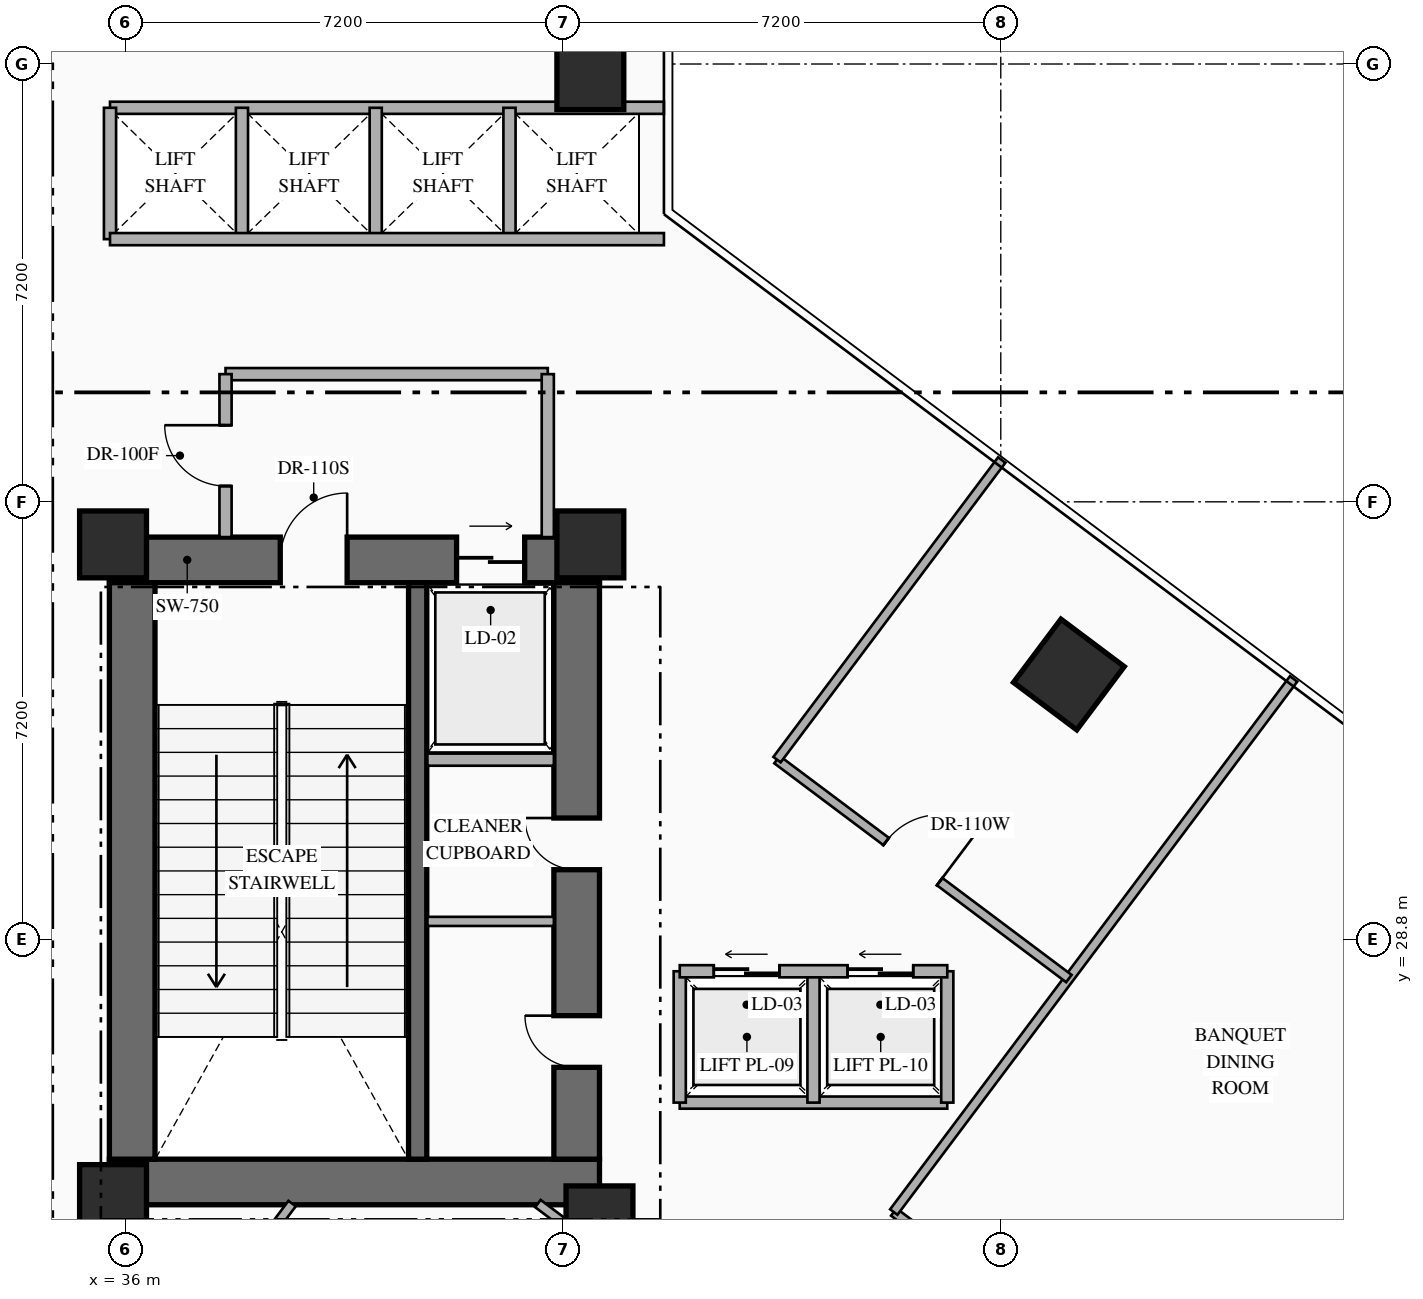
"""IFC4 building model, lengths in metres.
Left out: names, types, materials, properties, quantities, classifications, styles, units other than length and angle.
Written with IfcOpenShell. Run it as: python <this file> out.ifc"""

import sys

from ifc_helpers import new_model, si_unit, direction, frame, frame_2d, origin, origin_2d, place, context, subcontext, project, spatial, rectangle, extrude, element, fill, save


model = new_model("IFC4")
c1 = context("Model", 3, precision=1e-05, world=origin(), true_north=direction((0.0, 1.0)))
c2 = subcontext(c1, "Body", "Model", "MODEL_VIEW")
j1 = project(units=[si_unit("LENGTHUNIT", "METRE"), si_unit("PLANEANGLEUNIT", "RADIAN")], contexts=[c1])
p1 = place(None, origin())
s1 = spatial("IfcSite", under=j1, at=p1, CompositionType="ELEMENT")
p2 = place(p1, origin())
s2 = spatial("IfcBuilding", under=s1, at=p2, CompositionType="ELEMENT")
p3 = place(p2, frame((0.0, 0.0, 16.2)))
s3 = spatial("IfcBuildingStorey", under=s2, at=p3, CompositionType="ELEMENT", Elevation=16.2)
p4 = place(p3, frame((35.74, 24.815, 0.0), z_axis=(0.0, 0.0, 1.0), x_axis=(1.0, 0.0, 0.0)))
e1 = element("IfcWall", 1, at=p4, inside=s3, PredefinedType="SHEAR", context=c2, shape_type="SweptSolid", body=[
    extrude(rectangle(XDim=8.06, YDim=0.75, at=frame_2d((4.03, 0.0))), origin(), (0.0, 0.0, 1.0), 5.4),
])
p5 = place(p3, frame((35.74, 35.045, 0.0), z_axis=(0.0, 0.0, 1.0), x_axis=(1.0, 0.0, 0.0)))
e2 = element("IfcWall", 2, at=p5, inside=s3, PredefinedType="SHEAR", context=c2, shape_type="SweptSolid", body=[
    extrude(rectangle(XDim=8.06, YDim=0.75, at=frame_2d((4.03, 0.0))), origin(), (0.0, 0.0, 1.0), 5.4),
])
p6 = place(p5, frame((2.81, 0.0, 0.0)))
e3 = element("IfcOpeningElement", 3, at=p6, cuts=e2, PredefinedType="OPENING", context=c2, shape_type="SweptSolid", body=[
    extrude(rectangle(XDim=1.1, YDim=2.2, at=frame_2d((0.55, 1.1))), frame((0.0, 0.385, 0.0), z_axis=(0.0, -1.0, 0.0), x_axis=(1.0, 0.0, 0.0)), (0.0, 0.0, 1.0), 0.77),
])
p7 = place(p5, frame((5.71, 0.0, 0.0)))
e4 = element("IfcOpeningElement", 4, at=p7, cuts=e2, PredefinedType="OPENING", context=c2, shape_type="SweptSolid", body=[
    extrude(rectangle(XDim=1.12, YDim=2.15, at=frame_2d((0.56, 1.075))), frame((0.0, 0.385, 0.0), z_axis=(0.0, -1.0, 0.0), x_axis=(1.0, 0.0, 0.0)), (0.0, 0.0, 1.0), 0.77),
])
p8 = place(p3, frame((36.115, 25.19, 0.0), z_axis=(0.0, 0.0, 1.0), x_axis=(0.0, 1.0, 0.0)))
e5 = element("IfcWall", 5, at=p8, inside=s3, PredefinedType="SHEAR", context=c2, shape_type="SweptSolid", body=[
    extrude(rectangle(XDim=9.48, YDim=0.75, at=frame_2d((4.74, 0.0))), origin(), (0.0, 0.0, 1.0), 5.4),
])
p9 = place(p3, frame((43.425, 25.19, 0.0), z_axis=(0.0, 0.0, 1.0), x_axis=(0.0, 1.0, 0.0)))
e6 = element("IfcWall", 6, at=p9, inside=s3, PredefinedType="SHEAR", context=c2, shape_type="SweptSolid", body=[
    extrude(rectangle(XDim=9.48, YDim=0.75, at=frame_2d((4.74, 0.0))), origin(), (0.0, 0.0, 1.0), 5.4),
])
p10 = place(p9, frame((1.51, 0.0, 0.0)))
e7 = element("IfcOpeningElement", 7, at=p10, cuts=e6, PredefinedType="OPENING", context=c2, shape_type="SweptSolid", body=[
    extrude(rectangle(XDim=0.85, YDim=2.08, at=frame_2d((0.425, 1.04))), frame((0.0, 0.385, 0.0), z_axis=(0.0, -1.0, 0.0), x_axis=(1.0, 0.0, 0.0)), (0.0, 0.0, 1.0), 0.77),
])
p11 = place(p9, frame((4.76, 0.0, 0.0)))
e8 = element("IfcOpeningElement", 8, at=p11, cuts=e6, PredefinedType="OPENING", context=c2, shape_type="SweptSolid", body=[
    extrude(rectangle(XDim=0.85, YDim=2.08, at=frame_2d((0.425, 1.04))), frame((0.0, 0.385, 0.0), z_axis=(0.0, -1.0, 0.0), x_axis=(1.0, 0.0, 0.0)), (0.0, 0.0, 1.0), 0.77),
])
p12 = place(p3, frame((40.81, 25.19, 0.0), z_axis=(0.0, 0.0, 1.0), x_axis=(0.0, 1.0, 0.0)))
e9 = element("IfcWall", 9, at=p12, inside=s3, PredefinedType="SHEAR", context=c2, shape_type="SweptSolid", body=[
    extrude(rectangle(XDim=9.48, YDim=0.3, at=frame_2d((4.74, 0.0))), origin(), (0.0, 0.0, 1.0), 5.4),
])
for number, where, z_axis, x_axis in (
    (10, (35.8, 24.55, 0.0), (0.0, 0.0, 1.0), (1.0, 0.0, 0.0)),
    (11, (43.8, 24.2, 0.0), (0.0, 0.0, 1.0), (1.0, 0.0, 0.0)),
    (12, (35.8, 35.3, 0.0), (0.0, 0.0, 1.0), (1.0, 0.0, 0.0)),
    (13, (43.65, 35.3, 0.0), (0.0, 0.0, 1.0), (1.0, 0.0, 0.0)),
    (14, (43.65, 43.0, 0.0), (0.0, 0.0, 1.0), (1.0, 0.0, 0.0)),
):
    element("IfcColumn", number, at=place(p3, frame(where, z_axis=z_axis, x_axis=x_axis)), inside=s3, PredefinedType="COLUMN", context=c2, shape_type="SweptSolid", body=[
        extrude(rectangle(XDim=1.1, YDim=1.1, at=origin_2d()), origin(), (0.0, 0.0, 1.0), 5.4),
    ])
p13 = place(p3, frame((51.52, 33.16, 0.0), z_axis=(0.0, 0.0, 1.0), x_axis=(0.799999996291, -0.600000004945, 0.0)))
e15 = element("IfcColumn", 15, at=p13, inside=s3, PredefinedType="COLUMN", context=c2, shape_type="SweptSolid", body=[
    extrude(rectangle(XDim=1.3, YDim=1.3, at=origin_2d()), origin(), (0.0, 0.0, 1.0), 5.4),
])
p14 = place(p3, frame((40.97, 31.76, 0.0), z_axis=(0.0, 0.0, 1.0), x_axis=(1.0, 0.0, 0.0)))
e16 = element("IfcWall", 16, at=p14, inside=s3, PredefinedType="STANDARD", context=c2, shape_type="SweptSolid", body=[
    extrude(rectangle(XDim=2.08, YDim=0.2, at=frame_2d((1.04, 0.0))), origin(), (0.0, 0.0, 1.0), 5.1),
])
p15 = place(p3, frame((40.97, 29.1, 0.0), z_axis=(0.0, 0.0, 1.0), x_axis=(1.0, 0.0, 0.0)))
e17 = element("IfcWall", 17, at=p15, inside=s3, PredefinedType="PARTITIONING", context=c2, shape_type="SweptSolid", body=[
    extrude(rectangle(XDim=2.08, YDim=0.15, at=frame_2d((1.04, 0.0))), origin(), (0.0, 0.0, 1.0), 5.1),
])
p16 = place(p3, frame((37.65, 38.1, 0.0), z_axis=(0.0, 0.0, 1.0), x_axis=(1.0, 0.0, 0.0)))
e18 = element("IfcWall", 18, at=p16, inside=s3, PredefinedType="STANDARD", context=c2, shape_type="SweptSolid", body=[
    extrude(rectangle(XDim=5.3, YDim=0.2, at=frame_2d((2.65, 0.0))), origin(), (0.0, 0.0, 1.0), 5.1),
])
p17 = place(p3, frame((42.95, 35.42, 0.0), z_axis=(0.0, 0.0, 1.0), x_axis=(0.0, 1.0, 0.0)))
e19 = element("IfcWall", 19, at=p17, inside=s3, PredefinedType="STANDARD", context=c2, shape_type="SweptSolid", body=[
    extrude(rectangle(XDim=2.68, YDim=0.2, at=frame_2d((1.34, 0.0))), origin(), (0.0, 0.0, 1.0), 5.1),
])
p18 = place(p3, frame((37.65, 35.42, 0.0), z_axis=(0.0, 0.0, 1.0), x_axis=(0.0, 1.0, 0.0)))
e20 = element("IfcWall", 20, at=p18, inside=s3, PredefinedType="STANDARD", context=c2, shape_type="SweptSolid", body=[
    extrude(rectangle(XDim=2.68, YDim=0.2, at=frame_2d((1.34, 0.0))), origin(), (0.0, 0.0, 1.0), 5.1),
])
p19 = place(p18, frame((0.84, 0.0, 0.0)))
e21 = element("IfcOpeningElement", 21, at=p19, cuts=e20, PredefinedType="OPENING", context=c2, shape_type="SweptSolid", body=[
    extrude(rectangle(XDim=1.0, YDim=2.2, at=frame_2d((0.5, 1.1))), frame((0.0, 0.11, 0.0), z_axis=(0.0, -1.0, 0.0), x_axis=(1.0, 0.0, 0.0)), (0.0, 0.0, 1.0), 0.22),
])
p20 = place(p3, frame((35.75, 42.48, 0.0), z_axis=(0.0, 0.0, 1.0), x_axis=(1.0, 0.0, 0.0)))
e22 = element("IfcWall", 22, at=p20, inside=s3, PredefinedType="STANDARD", context=c2, shape_type="SweptSolid", body=[
    extrude(rectangle(XDim=9.11, YDim=0.2, at=frame_2d((4.555, 0.0))), origin(), (0.0, 0.0, 1.0), 5.1),
])
for number, where, z_axis, x_axis in (
    (23, (35.75, 40.32, 0.0), (0.0, 0.0, 1.0), (0.0, 1.0, 0.0)),
    (24, (37.92, 40.32, 0.0), (0.0, 0.0, 1.0), (0.0, 1.0, 0.0)),
    (25, (40.12, 40.32, 0.0), (0.0, 0.0, 1.0), (0.0, 1.0, 0.0)),
    (26, (42.32, 40.32, 0.0), (0.0, 0.0, 1.0), (0.0, 1.0, 0.0)),
):
    element("IfcWall", number, at=place(p3, frame(where, z_axis=z_axis, x_axis=x_axis)), inside=s3, PredefinedType="STANDARD", context=c2, shape_type="SweptSolid", body=[
        extrude(rectangle(XDim=2.16, YDim=0.2, at=frame_2d((1.08, 0.0))), origin(), (0.0, 0.0, 1.0), 5.1),
    ])
p21 = place(p3, frame((35.75, 40.32, 0.0), z_axis=(0.0, 0.0, 1.0), x_axis=(1.0, 0.0, 0.0)))
e27 = element("IfcWall", 27, at=p21, inside=s3, PredefinedType="STANDARD", context=c2, shape_type="SweptSolid", body=[
    extrude(rectangle(XDim=9.11, YDim=0.2, at=frame_2d((4.555, 0.0))), origin(), (0.0, 0.0, 1.0), 5.1),
])
p22 = place(p3, frame((45.12, 26.12, 0.0), z_axis=(0.0, 0.0, 1.0), x_axis=(1.0, 0.0, 0.0)))
e28 = element("IfcWall", 28, at=p22, inside=s3, PredefinedType="STANDARD", context=c2, shape_type="SweptSolid", body=[
    extrude(rectangle(XDim=4.4, YDim=0.2, at=frame_2d((2.2, 0.0))), origin(), (0.0, 0.0, 1.0), 5.1),
])
for number, where, z_axis, x_axis in (
    (29, (45.12, 26.12, 0.0), (0.0, 0.0, 1.0), (0.0, 1.0, 0.0)),
    (30, (49.52, 26.12, 0.0), (0.0, 0.0, 1.0), (0.0, 1.0, 0.0)),
    (31, (47.32, 26.12, 0.0), (0.0, 0.0, 1.0), (0.0, 1.0, 0.0)),
):
    element("IfcWall", number, at=place(p3, frame(where, z_axis=z_axis, x_axis=x_axis)), inside=s3, PredefinedType="STANDARD", context=c2, shape_type="SweptSolid", body=[
        extrude(rectangle(XDim=2.16, YDim=0.2, at=frame_2d((1.08, 0.0))), origin(), (0.0, 0.0, 1.0), 5.1),
    ])
p23 = place(p3, frame((45.12, 28.28, 0.0), z_axis=(0.0, 0.0, 1.0), x_axis=(1.0, 0.0, 0.0)))
e32 = element("IfcWall", 32, at=p23, inside=s3, PredefinedType="STANDARD", context=c2, shape_type="SweptSolid", body=[
    extrude(rectangle(XDim=4.4, YDim=0.2, at=frame_2d((2.2, 0.0))), origin(), (0.0, 0.0, 1.0), 5.1),
])
p24 = place(p23, frame((0.56, 0.0, 0.0)))
e33 = element("IfcOpeningElement", 33, at=p24, cuts=e32, PredefinedType="OPENING", context=c2, shape_type="SweptSolid", body=[
    extrude(rectangle(XDim=1.08, YDim=2.15, at=frame_2d((0.54, 1.075))), frame((0.0, 0.11, 0.0), z_axis=(0.0, -1.0, 0.0), x_axis=(1.0, 0.0, 0.0)), (0.0, 0.0, 1.0), 0.22),
])
p25 = place(p23, frame((2.76, 0.0, 0.0)))
e34 = element("IfcOpeningElement", 34, at=p25, cuts=e32, PredefinedType="OPENING", context=c2, shape_type="SweptSolid", body=[
    extrude(rectangle(XDim=1.08, YDim=2.15, at=frame_2d((0.54, 1.075))), frame((0.0, 0.11, 0.0), z_axis=(0.0, -1.0, 0.0), x_axis=(1.0, 0.0, 0.0)), (0.0, 0.0, 1.0), 0.22),
])
p26 = place(p3, frame((48.64, 24.32, 0.0), z_axis=(0.0, 0.0, 1.0), x_axis=(0.80000474051, -0.599993679268, 0.0)))
e35 = element("IfcWall", 35, at=p26, inside=s3, PredefinedType="PARTITIONING", context=c2, shape_type="SweptSolid", body=[
    extrude(rectangle(XDim=6.18, YDim=0.15, at=frame_2d((3.09, 0.0))), origin(), (0.0, 0.0, 1.0), 5.1),
])
p27 = place(p26, frame((2.54, 0.0, 0.0)))
e36 = element("IfcOpeningElement", 36, at=p27, cuts=e35, PredefinedType="OPENING", context=c2, shape_type="SweptSolid", body=[
    extrude(rectangle(XDim=1.1, YDim=2.16, at=frame_2d((0.55, 1.08))), frame((0.0, 0.085, 0.0), z_axis=(0.0, -1.0, 0.0), x_axis=(1.0, 0.0, 0.0)), (0.0, 0.0, 1.0), 0.17),
])
p28 = place(p3, frame((48.64, 24.32, 0.0), z_axis=(0.0, 0.0, 1.0), x_axis=(0.600017820398, 0.799986634391, 0.0)))
e37 = element("IfcWall", 37, at=p28, inside=s3, PredefinedType="PARTITIONING", context=c2, shape_type="SweptSolid", body=[
    extrude(rectangle(XDim=10.96, YDim=0.15, at=frame_2d((5.48, 0.0))), origin(), (0.0, 0.0, 1.0), 5.1),
])
p29 = place(p3, frame((53.584, 20.612, 0.0), z_axis=(0.0, 0.0, 1.0), x_axis=(0.600003564151, 0.799997326874, 0.0)))
e38 = element("IfcWall", 38, at=p29, inside=s3, PredefinedType="PARTITIONING", context=c2, shape_type="SweptSolid", body=[
    extrude(rectangle(XDim=10.96, YDim=0.15, at=frame_2d((5.48, 0.0))), origin(), (0.0, 0.0, 1.0), 5.1),
])
p30 = place(p3, frame((46.72, 31.76, 0.0), z_axis=(0.0, 0.0, 1.0), x_axis=(0.79999511724, -0.600006510291, 0.0)))
e39 = element("IfcWall", 39, at=p30, inside=s3, PredefinedType="PARTITIONING", context=c2, shape_type="SweptSolid", body=[
    extrude(rectangle(XDim=6.0, YDim=0.15, at=frame_2d((3.0, 0.0))), origin(), (0.0, 0.0, 1.0), 5.1),
])
p31 = place(p30, frame((2.243, 0.0, 0.0)))
e40 = element("IfcOpeningElement", 40, at=p31, cuts=e39, PredefinedType="OPENING", context=c2, shape_type="SweptSolid", body=[
    extrude(rectangle(XDim=1.1, YDim=2.16, at=frame_2d((0.55, 1.08))), frame((0.0, 0.085, 0.0), z_axis=(0.0, -1.0, 0.0), x_axis=(1.0, 0.0, 0.0)), (0.0, 0.0, 1.0), 0.17),
])
p32 = place(p3, frame((46.72, 31.76, 0.0), z_axis=(0.0, 0.0, 1.0), x_axis=(0.600006341286, 0.799995243996, 0.0)))
e41 = element("IfcWall", 41, at=p32, inside=s3, PredefinedType="PARTITIONING", context=c2, shape_type="SweptSolid", body=[
    extrude(rectangle(XDim=6.16, YDim=0.15, at=frame_2d((3.08, 0.0))), origin(), (0.0, 0.0, 1.0), 5.1),
])
p33 = place(p3, frame((42.787, 24.46, 0.0), z_axis=(0.0, 0.0, 1.0), x_axis=(0.799971872363, -0.600037501685, 0.0)))
e42 = element("IfcWall", 42, at=p33, inside=s3, PredefinedType="PARTITIONING", context=c2, shape_type="SweptSolid", body=[
    extrude(rectangle(XDim=4.167, YDim=0.15, at=frame_2d((2.083, 0.0))), origin(), (0.0, 0.0, 1.0), 5.1),
])
p34 = place(p33, frame((2.468, 0.0, 0.0)))
e43 = element("IfcOpeningElement", 43, at=p34, cuts=e42, PredefinedType="OPENING", context=c2, shape_type="SweptSolid", body=[
    extrude(rectangle(XDim=0.95, YDim=2.15, at=frame_2d((0.475, 1.075))), frame((0.0, 0.085, 0.0), z_axis=(0.0, -1.0, 0.0), x_axis=(1.0, 0.0, 0.0)), (0.0, 0.0, 1.0), 0.17),
])
p35 = place(p3, frame((33.384, 17.312, 0.0), z_axis=(0.0, 0.0, 1.0), x_axis=(0.600008743659, 0.799993442181, 0.0)))
e44 = element("IfcWall", 44, at=p35, inside=s3, PredefinedType="PARTITIONING", context=c2, shape_type="SweptSolid", body=[
    extrude(rectangle(XDim=8.935, YDim=0.15, at=frame_2d((4.468, 0.0))), origin(), (0.0, 0.0, 1.0), 5.1),
])
p36 = place(p6, origin())
e45 = element("IfcDoor", 45, at=p36, inside=s3, OperationType="SINGLE_SWING_RIGHT", PredefinedType="DOOR", context=c2, shape_type="SweptSolid", body=[
    extrude(rectangle(XDim=1.1, YDim=2.2, at=frame_2d((0.55, 1.1))), frame((0.0, 0.025, 0.0), z_axis=(0.0, -1.0, 0.0), x_axis=(1.0, 0.0, 0.0)), (0.0, 0.0, 1.0), 0.05),
])
fill(e3, e45)
p37 = place(p7, origin())
e46 = element("IfcDoor", 46, at=p37, inside=s3, OperationType="SLIDING_TO_RIGHT", PredefinedType="USERDEFINED", context=c2, shape_type="SweptSolid", body=[
    extrude(rectangle(XDim=1.12, YDim=2.15, at=frame_2d((0.56, 1.075))), frame((0.0, 0.025, 0.0), z_axis=(0.0, -1.0, 0.0), x_axis=(1.0, 0.0, 0.0)), (0.0, 0.0, 1.0), 0.05),
])
fill(e4, e46)
p38 = place(p10, origin())
e47 = element("IfcDoor", 47, at=p38, inside=s3, OperationType="SINGLE_SWING_RIGHT", PredefinedType="DOOR", context=c2, shape_type="SweptSolid", body=[
    extrude(rectangle(XDim=0.85, YDim=2.08, at=frame_2d((0.425, 1.04))), frame((0.0, 0.025, 0.0), z_axis=(0.0, -1.0, 0.0), x_axis=(1.0, 0.0, 0.0)), (0.0, 0.0, 1.0), 0.05),
])
fill(e7, e47)
p39 = place(p11, origin())
e48 = element("IfcDoor", 48, at=p39, inside=s3, OperationType="SINGLE_SWING_RIGHT", PredefinedType="DOOR", context=c2, shape_type="SweptSolid", body=[
    extrude(rectangle(XDim=0.85, YDim=2.08, at=frame_2d((0.425, 1.04))), frame((0.0, 0.025, 0.0), z_axis=(0.0, -1.0, 0.0), x_axis=(1.0, 0.0, 0.0)), (0.0, 0.0, 1.0), 0.05),
])
fill(e8, e48)
p40 = place(p19, origin())
e49 = element("IfcDoor", 49, at=p40, inside=s3, OperationType="SINGLE_SWING_RIGHT", PredefinedType="DOOR", context=c2, shape_type="SweptSolid", body=[
    extrude(rectangle(XDim=1.0, YDim=2.2, at=frame_2d((0.5, 1.1))), frame((0.0, 0.025, 0.0), z_axis=(0.0, -1.0, 0.0), x_axis=(1.0, 0.0, 0.0)), (0.0, 0.0, 1.0), 0.05),
])
fill(e21, e49)
p41 = place(p24, origin())
e50 = element("IfcDoor", 50, at=p41, inside=s3, OperationType="SLIDING_TO_LEFT", PredefinedType="USERDEFINED", context=c2, shape_type="SweptSolid", body=[
    extrude(rectangle(XDim=1.08, YDim=2.15, at=frame_2d((0.54, 1.075))), frame((0.0, 0.025, 0.0), z_axis=(0.0, -1.0, 0.0), x_axis=(1.0, 0.0, 0.0)), (0.0, 0.0, 1.0), 0.05),
])
fill(e33, e50)
p42 = place(p25, origin())
e51 = element("IfcDoor", 51, at=p42, inside=s3, OperationType="SLIDING_TO_LEFT", PredefinedType="USERDEFINED", context=c2, shape_type="SweptSolid", body=[
    extrude(rectangle(XDim=1.08, YDim=2.15, at=frame_2d((0.54, 1.075))), frame((0.0, 0.025, 0.0), z_axis=(0.0, -1.0, 0.0), x_axis=(1.0, 0.0, 0.0)), (0.0, 0.0, 1.0), 0.05),
])
fill(e34, e51)
p43 = place(p31, origin())
e52 = element("IfcDoor", 52, at=p43, inside=s3, OperationType="SINGLE_SWING_RIGHT", PredefinedType="DOOR", context=c2, shape_type="SweptSolid", body=[
    extrude(rectangle(XDim=1.1, YDim=2.16, at=frame_2d((0.55, 1.08))), frame((0.0, 0.025, 0.0), z_axis=(0.0, -1.0, 0.0), x_axis=(1.0, 0.0, 0.0)), (0.0, 0.0, 1.0), 0.05),
])
fill(e40, e52)
save(model, sys.argv[1])
